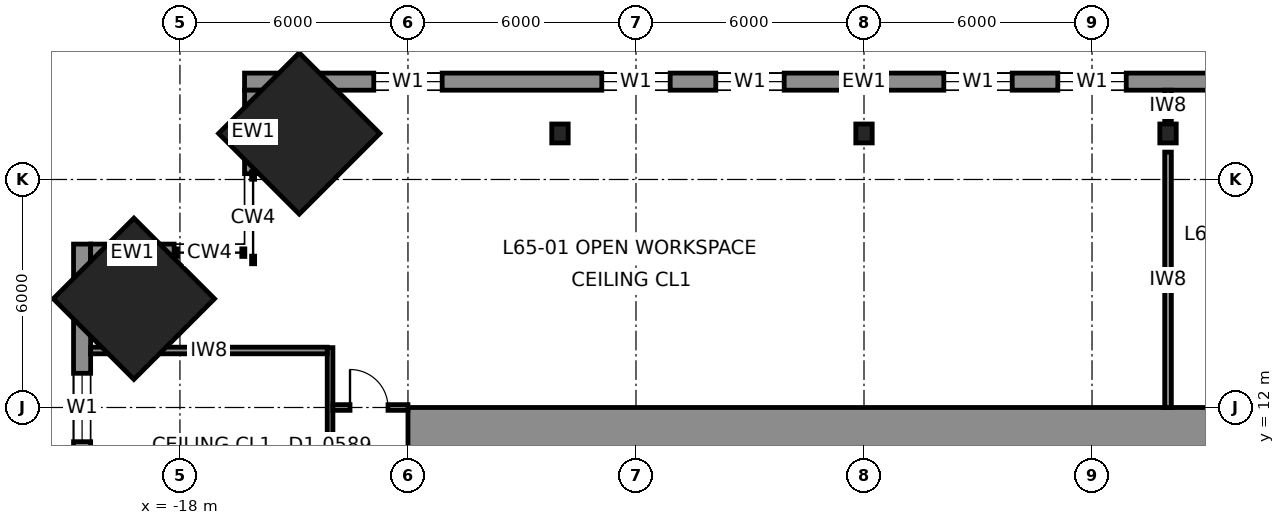
"""IFC4 building model, lengths in metres.
Left out: names, types, materials, properties, quantities, classifications, styles, units other than length and angle.
Written with IfcOpenShell. Run it as: python <this file> out.ifc"""

import sys

from ifc_helpers import new_model, si_unit, direction, frame, frame_2d, origin, origin_2d, place, context, subcontext, project, spatial, rectangle, i_section, extrude, element, fill, save


model = new_model("IFC4")
c1 = context("Model", 3, precision=1e-05, world=origin(), true_north=direction((0.0, 1.0)))
c2 = subcontext(c1, "Body", "Model", "MODEL_VIEW")
j1 = project(units=[si_unit("LENGTHUNIT", "METRE"), si_unit("PLANEANGLEUNIT", "RADIAN")], contexts=[c1])
p1 = place(None, origin())
s1 = spatial("IfcSite", under=j1, at=p1, CompositionType="ELEMENT")
p2 = place(p1, origin())
s2 = spatial("IfcBuilding", under=s1, at=p2, CompositionType="ELEMENT")
p3 = place(p2, frame((0.0, 0.0, 289.8)))
s3 = spatial("IfcBuildingStorey", under=s2, at=p3, CompositionType="ELEMENT", Elevation=289.8)
for number, where, z_axis, x_axis in (
    (1, (-19.211, 14.861, 0.0), (0.04, -0.04, 0.998), (0.708, 0.707, 0.0)),
    (2, (-14.861, 19.211, 0.0), (0.04, -0.04, 0.998), (0.707, 0.708, 0.0)),
):
    element("IfcColumn", number, at=place(p3, frame(where, z_axis=z_axis, x_axis=x_axis)), inside=s3, PredefinedType="COLUMN", context=c2, shape_type="SweptSolid", body=[
        extrude(rectangle(XDim=3.0, YDim=3.0, at=origin_2d()), origin(), (0.0, 0.0, 1.0), 4.007),
    ])
for number, where, z_axis, x_axis in (
    (3, (0.0, 19.211, 0.0), (0.0, -0.04, 0.999), (1.0, 0.0, 0.0)),
    (4, (8.0, 19.211, 0.0), (0.0, -0.04, 0.999), (1.0, 0.0, 0.0)),
    (5, (-8.0, 19.211, 0.0), (0.0, -0.04, 0.999), (1.0, 0.0, 0.0)),
):
    element("IfcColumn", number, at=place(p3, frame(where, z_axis=z_axis, x_axis=x_axis)), inside=s3, PredefinedType="COLUMN", context=c2, shape_type="SweptSolid", body=[
        extrude(i_section(OverallWidth=0.432, OverallDepth=0.498, WebThickness=0.056, FlangeThickness=0.089, at=origin_2d()), origin(), (0.0, 0.0, 1.0), 4.003),
    ])
p4 = place(p3, frame((-12.0, 11.25, 0.0), z_axis=(0.0, 0.0, 1.0), x_axis=(1.0, 0.0, 0.0)))
e6 = element("IfcWall", 6, at=p4, inside=s3, PredefinedType="SHEAR", context=c2, shape_type="SweptSolid", body=[
    extrude(rectangle(XDim=24.0, YDim=1.5, at=frame_2d((12.0, 0.0))), origin(), (0.0, 0.0, 1.0), 4.0),
])
p5 = place(p3, frame((16.3, 20.575, 0.0), z_axis=(0.0, 0.0, 1.0), x_axis=(-1.0, 0.0, 0.0)))
e7 = element("IfcWall", 7, at=p5, inside=s3, PredefinedType="SOLIDWALL", context=c2, shape_type="SweptSolid", body=[
    extrude(rectangle(XDim=32.6, YDim=0.45, at=frame_2d((16.3, 0.0))), origin(), (0.0, 0.0, 1.0), 3.83),
])
p6 = place(p5, frame((3.4, 0.0, 0.7)))
e8 = element("IfcOpeningElement", 8, at=p6, cuts=e7, PredefinedType="OPENING", context=c2, shape_type="SweptSolid", body=[
    extrude(rectangle(XDim=1.8, YDim=2.6, at=frame_2d((0.9, 1.3))), frame((0.0, 0.235, 0.0), z_axis=(0.0, -1.0, 0.0), x_axis=(1.0, 0.0, 0.0)), (0.0, 0.0, 1.0), 0.47),
])
p7 = place(p5, frame((9.4, 0.0, 0.7)))
e9 = element("IfcOpeningElement", 9, at=p7, cuts=e7, PredefinedType="OPENING", context=c2, shape_type="SweptSolid", body=[
    extrude(rectangle(XDim=1.8, YDim=2.6, at=frame_2d((0.9, 1.3))), frame((0.0, 0.235, 0.0), z_axis=(0.0, -1.0, 0.0), x_axis=(1.0, 0.0, 0.0)), (0.0, 0.0, 1.0), 0.47),
])
p8 = place(p5, frame((12.4, 0.0, 0.7)))
e10 = element("IfcOpeningElement", 10, at=p8, cuts=e7, PredefinedType="OPENING", context=c2, shape_type="SweptSolid", body=[
    extrude(rectangle(XDim=1.8, YDim=2.6, at=frame_2d((0.9, 1.3))), frame((0.0, 0.235, 0.0), z_axis=(0.0, -1.0, 0.0), x_axis=(1.0, 0.0, 0.0)), (0.0, 0.0, 1.0), 0.47),
])
p9 = place(p5, frame((18.4, 0.0, 0.7)))
e11 = element("IfcOpeningElement", 11, at=p9, cuts=e7, PredefinedType="OPENING", context=c2, shape_type="SweptSolid", body=[
    extrude(rectangle(XDim=1.8, YDim=2.6, at=frame_2d((0.9, 1.3))), frame((0.0, 0.235, 0.0), z_axis=(0.0, -1.0, 0.0), x_axis=(1.0, 0.0, 0.0)), (0.0, 0.0, 1.0), 0.47),
])
p10 = place(p5, frame((21.4, 0.0, 0.7)))
e12 = element("IfcOpeningElement", 12, at=p10, cuts=e7, PredefinedType="OPENING", context=c2, shape_type="SweptSolid", body=[
    extrude(rectangle(XDim=1.8, YDim=2.6, at=frame_2d((0.9, 1.3))), frame((0.0, 0.235, 0.0), z_axis=(0.0, -1.0, 0.0), x_axis=(1.0, 0.0, 0.0)), (0.0, 0.0, 1.0), 0.47),
])
p11 = place(p5, frame((27.4, 0.0, 0.7)))
e13 = element("IfcOpeningElement", 13, at=p11, cuts=e7, PredefinedType="OPENING", context=c2, shape_type="SweptSolid", body=[
    extrude(rectangle(XDim=1.8, YDim=2.6, at=frame_2d((0.9, 1.3))), frame((0.0, 0.235, 0.0), z_axis=(0.0, -1.0, 0.0), x_axis=(1.0, 0.0, 0.0)), (0.0, 0.0, 1.0), 0.47),
])
p12 = place(p3, frame((-20.575, 16.3, 0.0), z_axis=(0.0, 0.0, 1.0), x_axis=(0.0, -1.0, 0.0)))
e14 = element("IfcWall", 14, at=p12, inside=s3, PredefinedType="SOLIDWALL", context=c2, shape_type="SweptSolid", body=[
    extrude(rectangle(XDim=32.6, YDim=0.45, at=frame_2d((16.3, 0.0))), origin(), (0.0, 0.0, 1.0), 3.83),
])
p13 = place(p12, frame((3.4, 0.0, 0.7)))
e15 = element("IfcOpeningElement", 15, at=p13, cuts=e14, PredefinedType="OPENING", context=c2, shape_type="SweptSolid", body=[
    extrude(rectangle(XDim=1.8, YDim=2.6, at=frame_2d((0.9, 1.3))), frame((0.0, 0.235, 0.0), z_axis=(0.0, -1.0, 0.0), x_axis=(1.0, 0.0, 0.0)), (0.0, 0.0, 1.0), 0.47),
])
p14 = place(p12, frame((9.4, 0.0, 0.7)))
e16 = element("IfcOpeningElement", 16, at=p14, cuts=e14, PredefinedType="OPENING", context=c2, shape_type="SweptSolid", body=[
    extrude(rectangle(XDim=1.8, YDim=2.6, at=frame_2d((0.9, 1.3))), frame((0.0, 0.235, 0.0), z_axis=(0.0, -1.0, 0.0), x_axis=(1.0, 0.0, 0.0)), (0.0, 0.0, 1.0), 0.47),
])
p15 = place(p12, frame((12.4, 0.0, 0.7)))
e17 = element("IfcOpeningElement", 17, at=p15, cuts=e14, PredefinedType="OPENING", context=c2, shape_type="SweptSolid", body=[
    extrude(rectangle(XDim=1.8, YDim=2.6, at=frame_2d((0.9, 1.3))), frame((0.0, 0.235, 0.0), z_axis=(0.0, -1.0, 0.0), x_axis=(1.0, 0.0, 0.0)), (0.0, 0.0, 1.0), 0.47),
])
p16 = place(p12, frame((18.4, 0.0, 0.7)))
e18 = element("IfcOpeningElement", 18, at=p16, cuts=e14, PredefinedType="OPENING", context=c2, shape_type="SweptSolid", body=[
    extrude(rectangle(XDim=1.8, YDim=2.6, at=frame_2d((0.9, 1.3))), frame((0.0, 0.235, 0.0), z_axis=(0.0, -1.0, 0.0), x_axis=(1.0, 0.0, 0.0)), (0.0, 0.0, 1.0), 0.47),
])
p17 = place(p12, frame((21.4, 0.0, 0.7)))
e19 = element("IfcOpeningElement", 19, at=p17, cuts=e14, PredefinedType="OPENING", context=c2, shape_type="SweptSolid", body=[
    extrude(rectangle(XDim=1.8, YDim=2.6, at=frame_2d((0.9, 1.3))), frame((0.0, 0.235, 0.0), z_axis=(0.0, -1.0, 0.0), x_axis=(1.0, 0.0, 0.0)), (0.0, 0.0, 1.0), 0.47),
])
p18 = place(p12, frame((27.4, 0.0, 0.7)))
e20 = element("IfcOpeningElement", 20, at=p18, cuts=e14, PredefinedType="OPENING", context=c2, shape_type="SweptSolid", body=[
    extrude(rectangle(XDim=1.8, YDim=2.6, at=frame_2d((0.9, 1.3))), frame((0.0, 0.235, 0.0), z_axis=(0.0, -1.0, 0.0), x_axis=(1.0, 0.0, 0.0)), (0.0, 0.0, 1.0), 0.47),
])
for number, where, z_axis, x_axis in (
    (21, (-16.075, 18.154, 0.0), (0.0, 0.0, 1.0), (0.0, 1.0, 0.0)),
    (22, (-18.154, 16.075, 0.0), (0.0, 0.0, 1.0), (-1.0, 0.0, 0.0)),
):
    element("IfcWall", number, at=place(p3, frame(where, z_axis=z_axis, x_axis=x_axis)), inside=s3, PredefinedType="SOLIDWALL", context=c2, shape_type="SweptSolid", body=[
        extrude(rectangle(XDim=2.197, YDim=0.45, at=frame_2d((1.098, 0.0))), origin(), (0.0, 0.0, 1.0), 3.83),
    ])
p19 = place(p3, frame((-14.05, 13.575, 0.0), z_axis=(0.0, 0.0, 1.0), x_axis=(0.0, -1.0, 0.0)))
e23 = element("IfcWall", 23, at=p19, inside=s3, PredefinedType="PARTITIONING", context=c2, shape_type="SweptSolid", body=[
    extrude(rectangle(XDim=27.15, YDim=0.15, at=frame_2d((13.575, 0.0))), origin(), (0.0, 0.0, 1.0), 3.83),
])
p20 = place(p19, frame((22.975, 0.0, 0.0)))
e24 = element("IfcOpeningElement", 24, at=p20, cuts=e23, PredefinedType="OPENING", context=c2, shape_type="SweptSolid", body=[
    extrude(rectangle(XDim=1.0, YDim=2.3, at=frame_2d((0.5, 1.15))), frame((0.0, 0.085, 0.0), z_axis=(0.0, -1.0, 0.0), x_axis=(1.0, 0.0, 0.0)), (0.0, 0.0, 1.0), 0.17),
])
p21 = place(p19, frame((19.525, 0.0, 0.0)))
e25 = element("IfcOpeningElement", 25, at=p21, cuts=e23, PredefinedType="OPENING", context=c2, shape_type="SweptSolid", body=[
    extrude(rectangle(XDim=1.0, YDim=2.3, at=frame_2d((0.5, 1.15))), frame((0.0, 0.085, 0.0), z_axis=(0.0, -1.0, 0.0), x_axis=(1.0, 0.0, 0.0)), (0.0, 0.0, 1.0), 0.17),
])
p22 = place(p19, frame((8.875, 0.0, 0.0)))
e26 = element("IfcOpeningElement", 26, at=p22, cuts=e23, PredefinedType="OPENING", context=c2, shape_type="SweptSolid", body=[
    extrude(rectangle(XDim=1.4, YDim=2.3, at=frame_2d((0.7, 1.15))), frame((0.0, 0.085, 0.0), z_axis=(0.0, -1.0, 0.0), x_axis=(1.0, 0.0, 0.0)), (0.0, 0.0, 1.0), 0.17),
])
p23 = place(p19, frame((3.175, 0.0, 0.0)))
e27 = element("IfcOpeningElement", 27, at=p23, cuts=e23, PredefinedType="OPENING", context=c2, shape_type="SweptSolid", body=[
    extrude(rectangle(XDim=1.0, YDim=2.3, at=frame_2d((0.5, 1.15))), frame((0.0, 0.085, 0.0), z_axis=(0.0, -1.0, 0.0), x_axis=(1.0, 0.0, 0.0)), (0.0, 0.0, 1.0), 0.17),
])
p24 = place(p19, frame((16.575, 0.0, 0.0)))
e28 = element("IfcOpeningElement", 28, at=p24, cuts=e23, PredefinedType="OPENING", context=c2, shape_type="SweptSolid", body=[
    extrude(rectangle(XDim=1.0, YDim=2.3, at=frame_2d((0.5, 1.15))), frame((0.0, 0.085, 0.0), z_axis=(0.0, -1.0, 0.0), x_axis=(1.0, 0.0, 0.0)), (0.0, 0.0, 1.0), 0.17),
])
p25 = place(p3, frame((-13.975, 12.0, 0.0), z_axis=(0.0, 0.0, 1.0), x_axis=(1.0, 0.0, 0.0)))
e29 = element("IfcWall", 29, at=p25, inside=s3, PredefinedType="PARTITIONING", context=c2, shape_type="SweptSolid", body=[
    extrude(rectangle(XDim=1.975, YDim=0.15, at=frame_2d((0.988, 0.0))), origin(), (0.0, 0.0, 1.0), 3.83),
])
p26 = place(p25, frame((0.45, 0.0, 0.0)))
e30 = element("IfcOpeningElement", 30, at=p26, cuts=e29, PredefinedType="OPENING", context=c2, shape_type="SweptSolid", body=[
    extrude(rectangle(XDim=1.0, YDim=2.3, at=frame_2d((0.5, 1.15))), frame((0.0, 0.085, 0.0), z_axis=(0.0, -1.0, 0.0), x_axis=(1.0, 0.0, 0.0)), (0.0, 0.0, 1.0), 0.17),
])
p27 = place(p3, frame((-20.35, 13.5, 0.0), z_axis=(0.0, 0.0, 1.0), x_axis=(1.0, 0.0, 0.0)))
e31 = element("IfcWall", 31, at=p27, inside=s3, PredefinedType="PARTITIONING", context=c2, shape_type="SweptSolid", body=[
    extrude(rectangle(XDim=6.225, YDim=0.175, at=frame_2d((3.113, 0.0))), origin(), (0.0, 0.0, 1.0), 3.83),
])
p28 = place(p3, frame((8.0, 12.0, 0.0), z_axis=(0.0, 0.0, 1.0), x_axis=(0.0, 1.0, 0.0)))
e32 = element("IfcWall", 32, at=p28, inside=s3, PredefinedType="PARTITIONING", context=c2, shape_type="SweptSolid", body=[
    extrude(rectangle(XDim=6.72, YDim=0.175, at=frame_2d((3.36, 0.0))), origin(), (0.0, 0.0, 1.0), 3.016),
])
p29 = place(p3, frame((8.0, 19.541, 0.0), z_axis=(0.0, 0.0, 1.0), x_axis=(0.0, 1.0, 0.0)))
e33 = element("IfcWall", 33, at=p29, inside=s3, PredefinedType="PARTITIONING", context=c2, shape_type="SweptSolid", body=[
    extrude(rectangle(XDim=0.809, YDim=0.175, at=frame_2d((0.405, 0.0))), origin(), (0.0, 0.0, 1.0), 3.83),
])
p30 = place(p7, origin())
e34 = element("IfcWindow", 34, at=p30, inside=s3, PartitioningType="SINGLE_PANEL", PredefinedType="WINDOW", context=c2, shape_type="SweptSolid", body=[
    extrude(rectangle(XDim=1.8, YDim=2.6, at=frame_2d((0.9, 1.3))), frame((0.0, 0.03, 0.0), z_axis=(0.0, -1.0, 0.0), x_axis=(1.0, 0.0, 0.0)), (0.0, 0.0, 1.0), 0.06),
])
fill(e9, e34)
p31 = place(p8, origin())
e35 = element("IfcWindow", 35, at=p31, inside=s3, PartitioningType="SINGLE_PANEL", PredefinedType="WINDOW", context=c2, shape_type="SweptSolid", body=[
    extrude(rectangle(XDim=1.8, YDim=2.6, at=frame_2d((0.9, 1.3))), frame((0.0, 0.03, 0.0), z_axis=(0.0, -1.0, 0.0), x_axis=(1.0, 0.0, 0.0)), (0.0, 0.0, 1.0), 0.06),
])
fill(e10, e35)
p32 = place(p9, origin())
e36 = element("IfcWindow", 36, at=p32, inside=s3, PartitioningType="SINGLE_PANEL", PredefinedType="WINDOW", context=c2, shape_type="SweptSolid", body=[
    extrude(rectangle(XDim=1.8, YDim=2.6, at=frame_2d((0.9, 1.3))), frame((0.0, 0.03, 0.0), z_axis=(0.0, -1.0, 0.0), x_axis=(1.0, 0.0, 0.0)), (0.0, 0.0, 1.0), 0.06),
])
fill(e11, e36)
p33 = place(p10, origin())
e37 = element("IfcWindow", 37, at=p33, inside=s3, PartitioningType="SINGLE_PANEL", PredefinedType="WINDOW", context=c2, shape_type="SweptSolid", body=[
    extrude(rectangle(XDim=1.8, YDim=2.6, at=frame_2d((0.9, 1.3))), frame((0.0, 0.03, 0.0), z_axis=(0.0, -1.0, 0.0), x_axis=(1.0, 0.0, 0.0)), (0.0, 0.0, 1.0), 0.06),
])
fill(e12, e37)
p34 = place(p11, origin())
e38 = element("IfcWindow", 38, at=p34, inside=s3, PartitioningType="SINGLE_PANEL", PredefinedType="WINDOW", context=c2, shape_type="SweptSolid", body=[
    extrude(rectangle(XDim=1.8, YDim=2.6, at=frame_2d((0.9, 1.3))), frame((0.0, 0.03, 0.0), z_axis=(0.0, -1.0, 0.0), x_axis=(1.0, 0.0, 0.0)), (0.0, 0.0, 1.0), 0.06),
])
fill(e13, e38)
p35 = place(p13, origin())
e39 = element("IfcWindow", 39, at=p35, inside=s3, PartitioningType="SINGLE_PANEL", PredefinedType="WINDOW", context=c2, shape_type="SweptSolid", body=[
    extrude(rectangle(XDim=1.8, YDim=2.6, at=frame_2d((0.9, 1.3))), frame((0.0, 0.03, 0.0), z_axis=(0.0, -1.0, 0.0), x_axis=(1.0, 0.0, 0.0)), (0.0, 0.0, 1.0), 0.06),
])
fill(e15, e39)
p36 = place(p26, origin())
e40 = element("IfcDoor", 40, at=p36, inside=s3, OperationType="SINGLE_SWING_LEFT", PredefinedType="DOOR", context=c2, shape_type="SweptSolid", body=[
    extrude(rectangle(XDim=1.0, YDim=2.3, at=frame_2d((0.5, 1.15))), frame((0.0, 0.025, 0.0), z_axis=(0.0, -1.0, 0.0), x_axis=(1.0, 0.0, 0.0)), (0.0, 0.0, 1.0), 0.05),
])
fill(e30, e40)
save(model, sys.argv[1])
